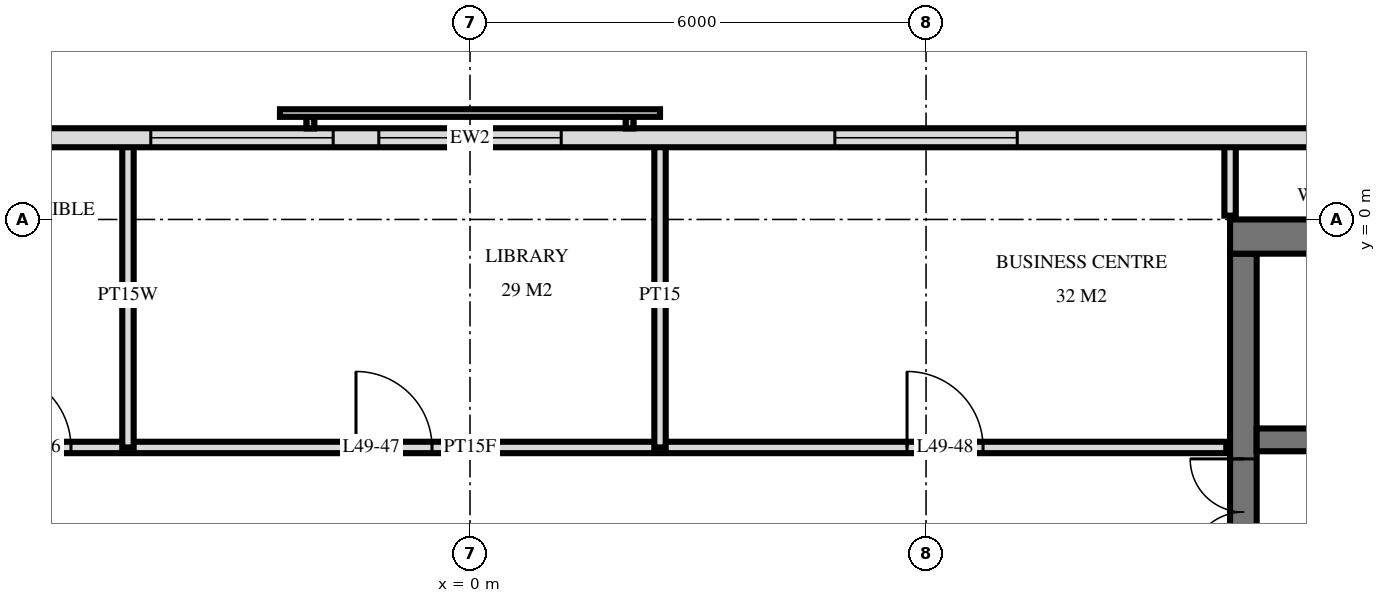
"""IFC4 building model, lengths in metres.
Left out: names, types, materials, properties, quantities, classifications, styles, units other than length and angle.
Written with IfcOpenShell. Run it as: python <this file> out.ifc"""

import sys

from ifc_helpers import new_model, si_unit, direction, frame, frame_2d, origin, place, context, subcontext, project, spatial, rectangle, extrude, element, fill, save


model = new_model("IFC4")
c1 = context("Model", 3, precision=1e-05, world=origin(), true_north=direction((0.0, 1.0)))
c2 = subcontext(c1, "Body", "Model", "MODEL_VIEW")
j1 = project(units=[si_unit("LENGTHUNIT", "METRE"), si_unit("PLANEANGLEUNIT", "RADIAN")], contexts=[c1])
p1 = place(None, origin())
s1 = spatial("IfcSite", under=j1, at=p1, CompositionType="ELEMENT")
p2 = place(p1, origin())
s2 = spatial("IfcBuilding", under=s1, at=p2, CompositionType="ELEMENT")
p3 = place(p2, frame((0.0, 0.0, 190.6)))
s3 = spatial("IfcBuildingStorey", under=s2, at=p3, CompositionType="ELEMENT", Elevation=190.6)
p4 = place(p3, frame((10.0, -0.225, 0.0), z_axis=(0.0, 0.0, 1.0), x_axis=(1.0, 0.0, 0.0)))
e1 = element("IfcWall", 1, at=p4, inside=s3, PredefinedType="SHEAR", context=c2, shape_type="SweptSolid", body=[
    extrude(rectangle(XDim=14.5, YDim=0.45, at=frame_2d((7.25, 0.0))), origin(), (0.0, 0.0, 1.0), 3.5),
])
p5 = place(p3, frame((10.175, -14.55, 0.0), z_axis=(0.0, 0.0, 1.0), x_axis=(0.0, 1.0, 0.0)))
e2 = element("IfcWall", 2, at=p5, inside=s3, PredefinedType="SHEAR", context=c2, shape_type="SweptSolid", body=[
    extrude(rectangle(XDim=14.1, YDim=0.35, at=frame_2d((7.05, 0.0))), origin(), (0.0, 0.0, 1.0), 3.5),
])
p6 = place(p5, frame((8.4, 0.0, 0.0)))
e3 = element("IfcOpeningElement", 3, at=p6, cuts=e2, PredefinedType="OPENING", context=c2, shape_type="SweptSolid", body=[
    extrude(rectangle(XDim=1.4, YDim=2.4, at=frame_2d((0.7, 1.2))), frame((0.0, 0.185, 0.0), z_axis=(0.0, -1.0, 0.0), x_axis=(1.0, 0.0, 0.0)), (0.0, 0.0, 1.0), 0.37),
])
p7 = place(p5, frame((10.0, 0.0, 0.0)))
e4 = element("IfcOpeningElement", 4, at=p7, cuts=e2, PredefinedType="OPENING", context=c2, shape_type="SweptSolid", body=[
    extrude(rectangle(XDim=1.4, YDim=2.4, at=frame_2d((0.7, 1.2))), frame((0.0, 0.185, 0.0), z_axis=(0.0, -1.0, 0.0), x_axis=(1.0, 0.0, 0.0)), (0.0, 0.0, 1.0), 0.37),
])
p8 = place(p5, frame((4.0, 0.0, 0.0)))
e5 = element("IfcOpeningElement", 5, at=p8, cuts=e2, PredefinedType="OPENING", context=c2, shape_type="SweptSolid", body=[
    extrude(rectangle(XDim=1.2, YDim=2.1, at=frame_2d((0.6, 1.05))), frame((0.0, 0.185, 0.0), z_axis=(0.0, -1.0, 0.0), x_axis=(1.0, 0.0, 0.0)), (0.0, 0.0, 1.0), 0.37),
])
p9 = place(p3, frame((10.35, -2.9, 0.0), z_axis=(0.0, 0.0, 1.0), x_axis=(1.0, 0.0, 0.0)))
e6 = element("IfcWall", 6, at=p9, inside=s3, PredefinedType="SHEAR", context=c2, shape_type="SweptSolid", body=[
    extrude(rectangle(XDim=13.7, YDim=0.3, at=frame_2d((6.85, 0.0))), origin(), (0.0, 0.0, 1.0), 3.5),
])
p10 = place(p9, frame((12.05, 0.0, 0.0)))
e7 = element("IfcOpeningElement", 7, at=p10, cuts=e6, PredefinedType="OPENING", context=c2, shape_type="SweptSolid", body=[
    extrude(rectangle(XDim=1.1, YDim=2.1, at=frame_2d((0.55, 1.05))), frame((0.0, 0.16, 0.0), z_axis=(0.0, -1.0, 0.0), x_axis=(1.0, 0.0, 0.0)), (0.0, 0.0, 1.0), 0.32),
])
p11 = place(p9, frame((6.9, 0.0, 0.0)))
e8 = element("IfcOpeningElement", 8, at=p11, cuts=e6, PredefinedType="OPENING", context=c2, shape_type="SweptSolid", body=[
    extrude(rectangle(XDim=0.9, YDim=2.1, at=frame_2d((0.45, 1.05))), frame((0.0, 0.16, 0.0), z_axis=(0.0, -1.0, 0.0), x_axis=(1.0, 0.0, 0.0)), (0.0, 0.0, 1.0), 0.32),
])
p12 = place(p9, frame((0.85, 0.0, 0.0)))
e9 = element("IfcOpeningElement", 9, at=p12, cuts=e6, PredefinedType="OPENING", context=c2, shape_type="SweptSolid", body=[
    extrude(rectangle(XDim=1.0, YDim=2.1, at=frame_2d((0.5, 1.05))), frame((0.0, 0.16, 0.0), z_axis=(0.0, -1.0, 0.0), x_axis=(1.0, 0.0, 0.0)), (0.0, 0.0, 1.0), 0.32),
])
p13 = place(p9, frame((3.85, 0.0, 0.0)))
e10 = element("IfcOpeningElement", 10, at=p13, cuts=e6, PredefinedType="OPENING", context=c2, shape_type="SweptSolid", body=[
    extrude(rectangle(XDim=1.0, YDim=2.1, at=frame_2d((0.5, 1.05))), frame((0.0, 0.16, 0.0), z_axis=(0.0, -1.0, 0.0), x_axis=(1.0, 0.0, 0.0)), (0.0, 0.0, 1.0), 0.32),
])
p14 = place(p9, frame((9.7, 0.0, 0.0)))
e11 = element("IfcOpeningElement", 11, at=p14, cuts=e6, PredefinedType="OPENING", context=c2, shape_type="SweptSolid", body=[
    extrude(rectangle(XDim=1.0, YDim=2.1, at=frame_2d((0.5, 1.05))), frame((0.0, 0.16, 0.0), z_axis=(0.0, -1.0, 0.0), x_axis=(1.0, 0.0, 0.0)), (0.0, 0.0, 1.0), 0.32),
])
p15 = place(p3, frame((22.475, 1.075, 0.0), z_axis=(0.0, 0.0, 1.0), x_axis=(-1.0, 0.0, 0.0)))
e12 = element("IfcWall", 12, at=p15, inside=s3, PredefinedType="SOLIDWALL", context=c2, shape_type="SweptSolid", body=[
    extrude(rectangle(XDim=44.951, YDim=0.25, at=frame_2d((22.475, 0.0))), origin(), (0.0, 0.0, 1.0), 3.22),
])
p16 = place(p15, frame((15.275, 0.0, 0.9)))
e13 = element("IfcOpeningElement", 13, at=p16, cuts=e12, PredefinedType="OPENING", context=c2, shape_type="SweptSolid", body=[
    extrude(rectangle(XDim=2.4, YDim=1.5, at=frame_2d((1.2, 0.75))), frame((0.0, 0.135, 0.0), z_axis=(0.0, -1.0, 0.0), x_axis=(1.0, 0.0, 0.0)), (0.0, 0.0, 1.0), 0.27),
])
p17 = place(p15, frame((21.275, 0.0, 0.9)))
e14 = element("IfcOpeningElement", 14, at=p17, cuts=e12, PredefinedType="OPENING", context=c2, shape_type="SweptSolid", body=[
    extrude(rectangle(XDim=2.4, YDim=1.5, at=frame_2d((1.2, 0.75))), frame((0.0, 0.135, 0.0), z_axis=(0.0, -1.0, 0.0), x_axis=(1.0, 0.0, 0.0)), (0.0, 0.0, 1.0), 0.27),
])
p18 = place(p15, frame((24.275, 0.0, 0.9)))
e15 = element("IfcOpeningElement", 15, at=p18, cuts=e12, PredefinedType="OPENING", context=c2, shape_type="SweptSolid", body=[
    extrude(rectangle(XDim=2.4, YDim=1.5, at=frame_2d((1.2, 0.75))), frame((0.0, 0.135, 0.0), z_axis=(0.0, -1.0, 0.0), x_axis=(1.0, 0.0, 0.0)), (0.0, 0.0, 1.0), 0.27),
])
p19 = place(p3, frame((10.0, 0.05, 0.0), z_axis=(0.0, 0.0, 1.0), x_axis=(0.0, 1.0, 0.0)))
e16 = element("IfcWall", 16, at=p19, inside=s3, PredefinedType="PARTITIONING", context=c2, shape_type="SweptSolid", body=[
    extrude(rectangle(XDim=0.97, YDim=0.15, at=frame_2d((0.485, 0.0))), origin(), (0.0, 0.0, 1.0), 3.22),
])
p20 = place(p3, frame((2.5, -3.0, 0.0), z_axis=(0.0, 0.0, 1.0), x_axis=(0.0, 1.0, 0.0)))
e17 = element("IfcWall", 17, at=p20, inside=s3, PredefinedType="PARTITIONING", context=c2, shape_type="SweptSolid", body=[
    extrude(rectangle(XDim=4.02, YDim=0.15, at=frame_2d((2.01, 0.0))), origin(), (0.0, 0.0, 1.0), 3.22),
])
p21 = place(p3, frame((-4.5, -3.0, 0.0), z_axis=(0.0, 0.0, 1.0), x_axis=(0.0, 1.0, 0.0)))
e18 = element("IfcWall", 18, at=p21, inside=s3, PredefinedType="PLUMBINGWALL", context=c2, shape_type="SweptSolid", body=[
    extrude(rectangle(XDim=4.02, YDim=0.15, at=frame_2d((2.01, 0.0))), origin(), (0.0, 0.0, 1.0), 3.22),
])
p22 = place(p3, frame((-9.95, -3.0, 0.0), z_axis=(0.0, 0.0, 1.0), x_axis=(1.0, 0.0, 0.0)))
e19 = element("IfcWall", 19, at=p22, inside=s3, PredefinedType="PARTITIONING", context=c2, shape_type="SweptSolid", body=[
    extrude(rectangle(XDim=19.9, YDim=0.15, at=frame_2d((9.95, 0.0))), origin(), (0.0, 0.0, 1.0), 3.22),
])
p23 = place(p22, frame((0.95, 0.0, 0.0)))
e20 = element("IfcOpeningElement", 20, at=p23, cuts=e19, PredefinedType="OPENING", context=c2, shape_type="SweptSolid", body=[
    extrude(rectangle(XDim=1.0, YDim=2.1, at=frame_2d((0.5, 1.05))), frame((0.0, 0.085, 0.0), z_axis=(0.0, -1.0, 0.0), x_axis=(1.0, 0.0, 0.0)), (0.0, 0.0, 1.0), 0.17),
])
p24 = place(p22, frame((3.7, 0.0, 0.0)))
e21 = element("IfcOpeningElement", 21, at=p24, cuts=e19, PredefinedType="OPENING", context=c2, shape_type="SweptSolid", body=[
    extrude(rectangle(XDim=1.0, YDim=2.1, at=frame_2d((0.5, 1.05))), frame((0.0, 0.085, 0.0), z_axis=(0.0, -1.0, 0.0), x_axis=(1.0, 0.0, 0.0)), (0.0, 0.0, 1.0), 0.17),
])
p25 = place(p22, frame((8.45, 0.0, 0.0)))
e22 = element("IfcOpeningElement", 22, at=p25, cuts=e19, PredefinedType="OPENING", context=c2, shape_type="SweptSolid", body=[
    extrude(rectangle(XDim=1.0, YDim=2.1, at=frame_2d((0.5, 1.05))), frame((0.0, 0.085, 0.0), z_axis=(0.0, -1.0, 0.0), x_axis=(1.0, 0.0, 0.0)), (0.0, 0.0, 1.0), 0.17),
])
p26 = place(p22, frame((15.7, 0.0, 0.0)))
e23 = element("IfcOpeningElement", 23, at=p26, cuts=e19, PredefinedType="OPENING", context=c2, shape_type="SweptSolid", body=[
    extrude(rectangle(XDim=1.0, YDim=2.1, at=frame_2d((0.5, 1.05))), frame((0.0, 0.085, 0.0), z_axis=(0.0, -1.0, 0.0), x_axis=(1.0, 0.0, 0.0)), (0.0, 0.0, 1.0), 0.17),
])
p27 = place(p16, origin())
e24 = element("IfcWindow", 24, at=p27, inside=s3, PartitioningType="SINGLE_PANEL", PredefinedType="WINDOW", context=c2, shape_type="SweptSolid", body=[
    extrude(rectangle(XDim=2.4, YDim=1.5, at=frame_2d((1.2, 0.75))), frame((0.0, 0.03, 0.0), z_axis=(0.0, -1.0, 0.0), x_axis=(1.0, 0.0, 0.0)), (0.0, 0.0, 1.0), 0.06),
])
fill(e13, e24)
p28 = place(p17, origin())
e25 = element("IfcWindow", 25, at=p28, inside=s3, PartitioningType="SINGLE_PANEL", PredefinedType="WINDOW", context=c2, shape_type="SweptSolid", body=[
    extrude(rectangle(XDim=2.4, YDim=1.5, at=frame_2d((1.2, 0.75))), frame((0.0, 0.03, 0.0), z_axis=(0.0, -1.0, 0.0), x_axis=(1.0, 0.0, 0.0)), (0.0, 0.0, 1.0), 0.06),
])
fill(e14, e25)
p29 = place(p18, origin())
e26 = element("IfcWindow", 26, at=p29, inside=s3, PartitioningType="SINGLE_PANEL", PredefinedType="WINDOW", context=c2, shape_type="SweptSolid", body=[
    extrude(rectangle(XDim=2.4, YDim=1.5, at=frame_2d((1.2, 0.75))), frame((0.0, 0.03, 0.0), z_axis=(0.0, -1.0, 0.0), x_axis=(1.0, 0.0, 0.0)), (0.0, 0.0, 1.0), 0.06),
])
fill(e15, e26)
p30 = place(p7, origin())
e27 = element("IfcDoor", 27, at=p30, inside=s3, OperationType="DOUBLE_DOOR_SINGLE_SWING", PredefinedType="DOOR", context=c2, shape_type="SweptSolid", body=[
    extrude(rectangle(XDim=1.4, YDim=2.4, at=frame_2d((0.7, 1.2))), frame((0.0, 0.025, 0.0), z_axis=(0.0, -1.0, 0.0), x_axis=(1.0, 0.0, 0.0)), (0.0, 0.0, 1.0), 0.05),
])
fill(e4, e27)
p31 = place(p24, origin())
e28 = element("IfcDoor", 28, at=p31, inside=s3, OperationType="SINGLE_SWING_RIGHT", PredefinedType="DOOR", context=c2, shape_type="SweptSolid", body=[
    extrude(rectangle(XDim=1.0, YDim=2.1, at=frame_2d((0.5, 1.05))), frame((0.0, 0.025, 0.0), z_axis=(0.0, -1.0, 0.0), x_axis=(1.0, 0.0, 0.0)), (0.0, 0.0, 1.0), 0.05),
])
fill(e21, e28)
p32 = place(p25, origin())
e29 = element("IfcDoor", 29, at=p32, inside=s3, OperationType="SINGLE_SWING_RIGHT", PredefinedType="DOOR", context=c2, shape_type="SweptSolid", body=[
    extrude(rectangle(XDim=1.0, YDim=2.1, at=frame_2d((0.5, 1.05))), frame((0.0, 0.025, 0.0), z_axis=(0.0, -1.0, 0.0), x_axis=(1.0, 0.0, 0.0)), (0.0, 0.0, 1.0), 0.05),
])
fill(e22, e29)
p33 = place(p26, origin())
e30 = element("IfcDoor", 30, at=p33, inside=s3, OperationType="SINGLE_SWING_RIGHT", PredefinedType="DOOR", context=c2, shape_type="SweptSolid", body=[
    extrude(rectangle(XDim=1.0, YDim=2.1, at=frame_2d((0.5, 1.05))), frame((0.0, 0.025, 0.0), z_axis=(0.0, -1.0, 0.0), x_axis=(1.0, 0.0, 0.0)), (0.0, 0.0, 1.0), 0.05),
])
fill(e23, e30)
save(model, sys.argv[1])
